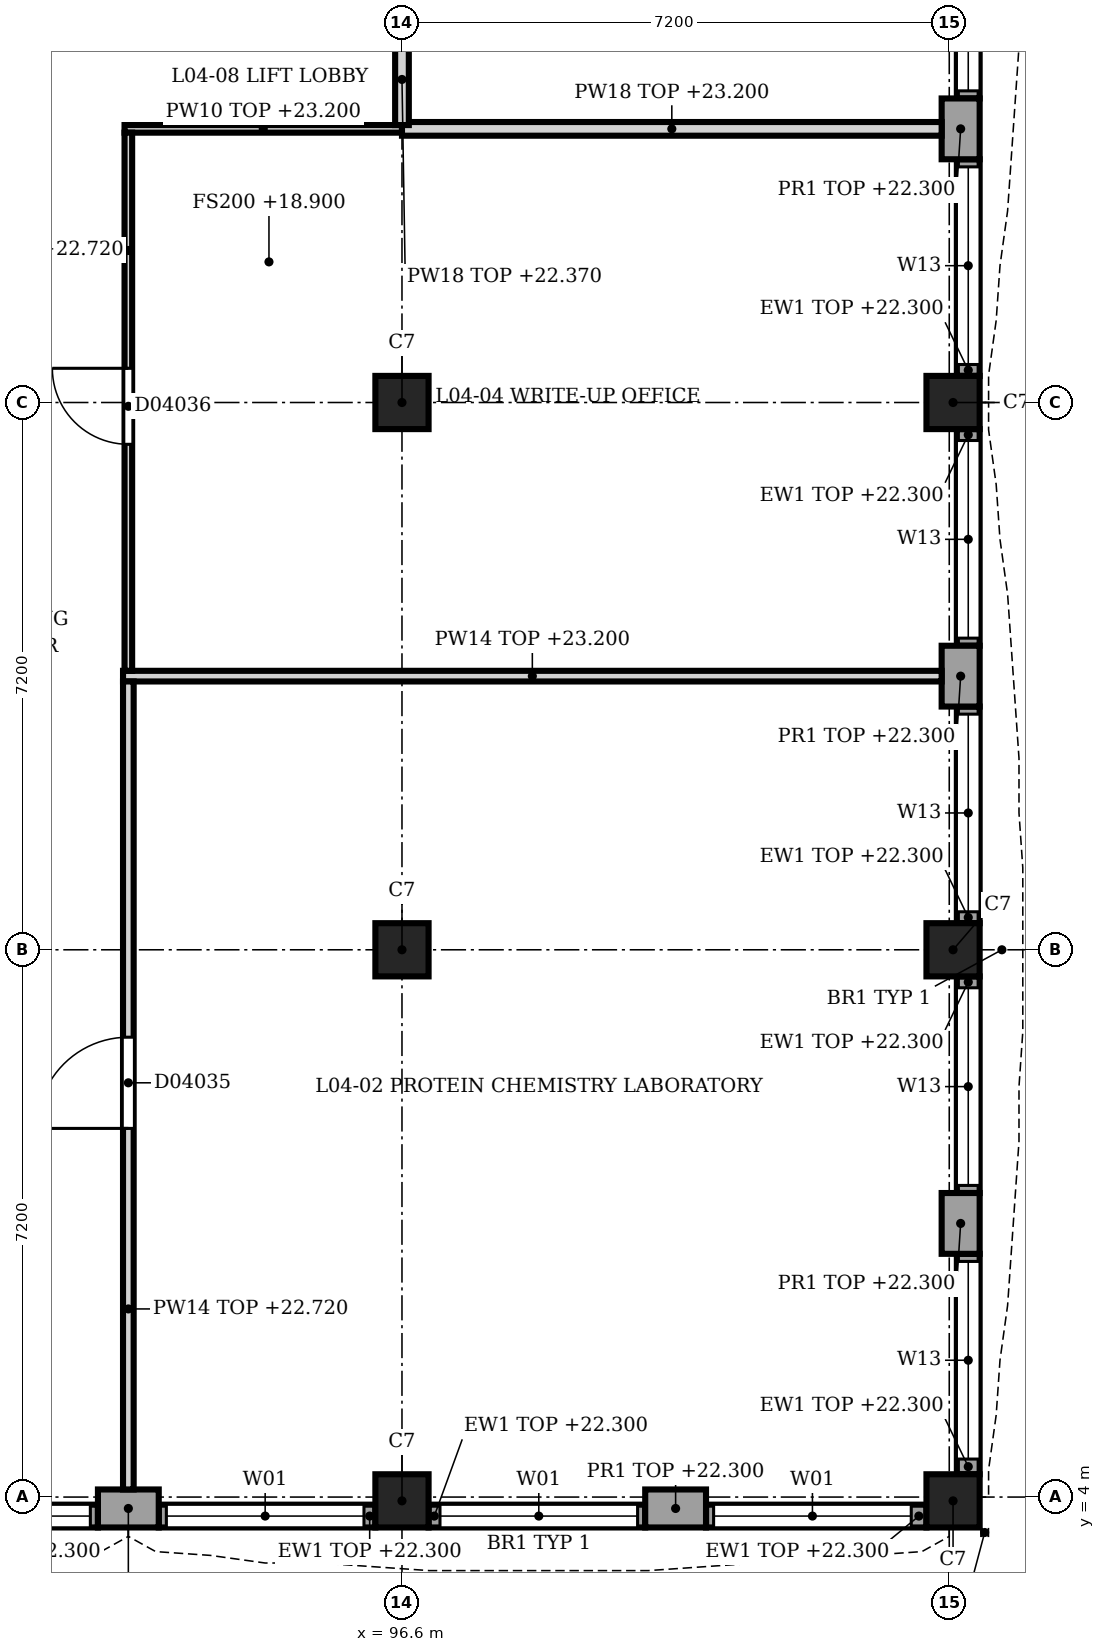
"""IFC4 building model, lengths in metres.
Left out: names, types, materials, properties, quantities, classifications, styles, units other than length and angle.
Written with IfcOpenShell. Run it as: python <this file> out.ifc"""

import sys

from ifc_helpers import new_model, si_unit, direction, frame, frame_2d, origin, origin_2d, place, context, subcontext, project, spatial, rectangle, extrude, element, fill, save


model = new_model("IFC4")
c1 = context("Model", 3, precision=1e-05, world=origin(), true_north=direction((0.0, 1.0)))
c2 = subcontext(c1, "Body", "Model", "MODEL_VIEW")
j1 = project(units=[si_unit("LENGTHUNIT", "METRE"), si_unit("PLANEANGLEUNIT", "RADIAN")], contexts=[c1])
p1 = place(None, origin())
s1 = spatial("IfcSite", under=j1, at=p1, CompositionType="ELEMENT")
p2 = place(p1, origin())
s2 = spatial("IfcBuilding", under=s1, at=p2, CompositionType="ELEMENT")
p3 = place(p2, frame((0.0, 0.0, 18.9)))
s3 = spatial("IfcBuildingStorey", under=s2, at=p3, CompositionType="ELEMENT", Elevation=18.9)
for number, where, z_axis, x_axis in (
    (1, (96.6, 3.95, 0.0), (0.0, 0.0, 1.0), (1.0, 0.0, 0.0)),
    (2, (96.6, 11.2, 0.0), (0.0, 0.0, 1.0), (1.0, 0.0, 0.0)),
    (3, (96.6, 18.4, 0.0), (0.0, 0.0, 1.0), (1.0, 0.0, 0.0)),
    (4, (103.85, 3.95, 0.0), (0.0, 0.0, 1.0), (1.0, 0.0, 0.0)),
    (5, (103.85, 11.2, 0.0), (0.0, 0.0, 1.0), (1.0, 0.0, 0.0)),
    (6, (103.85, 18.4, 0.0), (0.0, 0.0, 1.0), (1.0, 0.0, 0.0)),
):
    element("IfcColumn", number, at=place(p3, frame(where, z_axis=z_axis, x_axis=x_axis)), inside=s3, PredefinedType="COLUMN", context=c2, shape_type="SweptSolid", body=[
        extrude(rectangle(XDim=0.7, YDim=0.7, at=origin_2d()), origin(), (0.0, 0.0, 1.0), 4.5),
    ])
p4 = place(p3, frame((103.95, 22.4, 0.0), z_axis=(0.0, 0.0, 1.0), x_axis=(0.0, -1.0, 0.0)))
e7 = element("IfcWall", 7, at=p4, inside=s3, PredefinedType="SOLIDWALL", context=c2, shape_type="SweptSolid", body=[
    extrude(rectangle(XDim=0.8, YDim=0.5, at=frame_2d((0.4, 0.0))), origin(), (0.0, 0.0, 1.0), 3.4),
])
for number, where, z_axis, x_axis in (
    (8, (103.95, 15.2, 0.0), (0.0, 0.0, 1.0), (0.0, -1.0, 0.0)),
    (9, (103.95, 8.0, 0.0), (0.0, 0.0, 1.0), (0.0, -1.0, 0.0)),
):
    element("IfcWall", number, at=place(p3, frame(where, z_axis=z_axis, x_axis=x_axis)), inside=s3, PredefinedType="SOLIDWALL", context=c2, shape_type="SweptSolid", body=[
        extrude(rectangle(XDim=0.8, YDim=0.5, at=frame_2d((0.4, 0.0))), origin(), (0.0, 0.0, 1.0), 3.4),
    ])
p5 = place(p3, frame((104.05, 25.25, 0.0), z_axis=(0.0, 0.0, 1.0), x_axis=(0.0, -1.0, 0.0)))
e10 = element("IfcWall", 10, at=p5, inside=s3, PredefinedType="SOLIDWALL", context=c2, shape_type="SweptSolid", body=[
    extrude(rectangle(XDim=2.85, YDim=0.3, at=frame_2d((1.425, 0.0))), origin(), (0.0, 0.0, 1.0), 3.4),
])
p6 = place(p5, frame((0.15, 0.0, 0.9)))
e11 = element("IfcOpeningElement", 11, at=p6, cuts=e10, PredefinedType="OPENING", context=c2, shape_type="SweptSolid", body=[
    extrude(rectangle(XDim=2.6, YDim=2.2, at=frame_2d((1.3, 1.1))), frame((0.0, 0.16, 0.0), z_axis=(0.0, -1.0, 0.0), x_axis=(1.0, 0.0, 0.0)), (0.0, 0.0, 1.0), 0.32),
])
p7 = place(p3, frame((104.05, 21.6, 0.0), z_axis=(0.0, 0.0, 1.0), x_axis=(0.0, -1.0, 0.0)))
e12 = element("IfcWall", 12, at=p7, inside=s3, PredefinedType="SOLIDWALL", context=c2, shape_type="SweptSolid", body=[
    extrude(rectangle(XDim=2.85, YDim=0.3, at=frame_2d((1.425, 0.0))), origin(), (0.0, 0.0, 1.0), 3.4),
])
p8 = place(p7, frame((0.1, 0.0, 0.9)))
e13 = element("IfcOpeningElement", 13, at=p8, cuts=e12, PredefinedType="OPENING", context=c2, shape_type="SweptSolid", body=[
    extrude(rectangle(XDim=2.6, YDim=2.2, at=frame_2d((1.3, 1.1))), frame((0.0, 0.16, 0.0), z_axis=(0.0, -1.0, 0.0), x_axis=(1.0, 0.0, 0.0)), (0.0, 0.0, 1.0), 0.32),
])
p9 = place(p3, frame((104.05, 18.05, 0.0), z_axis=(0.0, 0.0, 1.0), x_axis=(0.0, -1.0, 0.0)))
e14 = element("IfcWall", 14, at=p9, inside=s3, PredefinedType="SOLIDWALL", context=c2, shape_type="SweptSolid", body=[
    extrude(rectangle(XDim=2.85, YDim=0.3, at=frame_2d((1.425, 0.0))), origin(), (0.0, 0.0, 1.0), 3.4),
])
p10 = place(p9, frame((0.15, 0.0, 0.9)))
e15 = element("IfcOpeningElement", 15, at=p10, cuts=e14, PredefinedType="OPENING", context=c2, shape_type="SweptSolid", body=[
    extrude(rectangle(XDim=2.6, YDim=2.2, at=frame_2d((1.3, 1.1))), frame((0.0, 0.16, 0.0), z_axis=(0.0, -1.0, 0.0), x_axis=(1.0, 0.0, 0.0)), (0.0, 0.0, 1.0), 0.32),
])
p11 = place(p3, frame((104.05, 14.4, 0.0), z_axis=(0.0, 0.0, 1.0), x_axis=(0.0, -1.0, 0.0)))
e16 = element("IfcWall", 16, at=p11, inside=s3, PredefinedType="SOLIDWALL", context=c2, shape_type="SweptSolid", body=[
    extrude(rectangle(XDim=2.85, YDim=0.3, at=frame_2d((1.425, 0.0))), origin(), (0.0, 0.0, 1.0), 3.4),
])
p12 = place(p11, frame((0.1, 0.0, 0.9)))
e17 = element("IfcOpeningElement", 17, at=p12, cuts=e16, PredefinedType="OPENING", context=c2, shape_type="SweptSolid", body=[
    extrude(rectangle(XDim=2.6, YDim=2.2, at=frame_2d((1.3, 1.1))), frame((0.0, 0.16, 0.0), z_axis=(0.0, -1.0, 0.0), x_axis=(1.0, 0.0, 0.0)), (0.0, 0.0, 1.0), 0.32),
])
p13 = place(p3, frame((104.05, 10.85, 0.0), z_axis=(0.0, 0.0, 1.0), x_axis=(0.0, -1.0, 0.0)))
e18 = element("IfcWall", 18, at=p13, inside=s3, PredefinedType="SOLIDWALL", context=c2, shape_type="SweptSolid", body=[
    extrude(rectangle(XDim=2.85, YDim=0.3, at=frame_2d((1.425, 0.0))), origin(), (0.0, 0.0, 1.0), 3.4),
])
p14 = place(p13, frame((0.15, 0.0, 0.9)))
e19 = element("IfcOpeningElement", 19, at=p14, cuts=e18, PredefinedType="OPENING", context=c2, shape_type="SweptSolid", body=[
    extrude(rectangle(XDim=2.6, YDim=2.2, at=frame_2d((1.3, 1.1))), frame((0.0, 0.16, 0.0), z_axis=(0.0, -1.0, 0.0), x_axis=(1.0, 0.0, 0.0)), (0.0, 0.0, 1.0), 0.32),
])
p15 = place(p3, frame((104.05, 7.2, 0.0), z_axis=(0.0, 0.0, 1.0), x_axis=(0.0, -1.0, 0.0)))
e20 = element("IfcWall", 20, at=p15, inside=s3, PredefinedType="SOLIDWALL", context=c2, shape_type="SweptSolid", body=[
    extrude(rectangle(XDim=2.9, YDim=0.3, at=frame_2d((1.45, 0.0))), origin(), (0.0, 0.0, 1.0), 3.4),
])
p16 = place(p15, frame((0.1, 0.0, 0.9)))
e21 = element("IfcOpeningElement", 21, at=p16, cuts=e20, PredefinedType="OPENING", context=c2, shape_type="SweptSolid", body=[
    extrude(rectangle(XDim=2.6, YDim=2.2, at=frame_2d((1.3, 1.1))), frame((0.0, 0.16, 0.0), z_axis=(0.0, -1.0, 0.0), x_axis=(1.0, 0.0, 0.0)), (0.0, 0.0, 1.0), 0.32),
])
p17 = place(p3, frame((100.6, 3.85, 0.0), z_axis=(0.0, 0.0, 1.0), x_axis=(-1.0, 0.0, 0.0)))
e22 = element("IfcWall", 22, at=p17, inside=s3, PredefinedType="SOLIDWALL", context=c2, shape_type="SweptSolid", body=[
    extrude(rectangle(XDim=0.8, YDim=0.5, at=frame_2d((0.4, 0.0))), origin(), (0.0, 0.0, 1.0), 3.4),
])
p18 = place(p3, frame((93.4, 3.85, 0.0), z_axis=(0.0, 0.0, 1.0), x_axis=(-1.0, 0.0, 0.0)))
e23 = element("IfcWall", 23, at=p18, inside=s3, PredefinedType="SOLIDWALL", context=c2, shape_type="SweptSolid", body=[
    extrude(rectangle(XDim=0.8, YDim=0.5, at=frame_2d((0.4, 0.0))), origin(), (0.0, 0.0, 1.0), 3.4),
])
p19 = place(p3, frame((103.5, 3.75, 0.0), z_axis=(0.0, 0.0, 1.0), x_axis=(-1.0, 0.0, 0.0)))
e24 = element("IfcWall", 24, at=p19, inside=s3, PredefinedType="SOLIDWALL", context=c2, shape_type="SweptSolid", body=[
    extrude(rectangle(XDim=2.9, YDim=0.3, at=frame_2d((1.45, 0.0))), origin(), (0.0, 0.0, 1.0), 3.4),
])
p20 = place(p19, frame((0.2, 0.0, 0.9)))
e25 = element("IfcOpeningElement", 25, at=p20, cuts=e24, PredefinedType="OPENING", context=c2, shape_type="SweptSolid", body=[
    extrude(rectangle(XDim=2.6, YDim=2.4, at=frame_2d((1.3, 1.2))), frame((0.0, 0.16, 0.0), z_axis=(0.0, -1.0, 0.0), x_axis=(1.0, 0.0, 0.0)), (0.0, 0.0, 1.0), 0.32),
])
p21 = place(p3, frame((99.8, 3.75, 0.0), z_axis=(0.0, 0.0, 1.0), x_axis=(-1.0, 0.0, 0.0)))
e26 = element("IfcWall", 26, at=p21, inside=s3, PredefinedType="SOLIDWALL", context=c2, shape_type="SweptSolid", body=[
    extrude(rectangle(XDim=2.85, YDim=0.3, at=frame_2d((1.425, 0.0))), origin(), (0.0, 0.0, 1.0), 3.4),
])
p22 = place(p21, frame((0.1, 0.0, 0.9)))
e27 = element("IfcOpeningElement", 27, at=p22, cuts=e26, PredefinedType="OPENING", context=c2, shape_type="SweptSolid", body=[
    extrude(rectangle(XDim=2.6, YDim=2.4, at=frame_2d((1.3, 1.2))), frame((0.0, 0.16, 0.0), z_axis=(0.0, -1.0, 0.0), x_axis=(1.0, 0.0, 0.0)), (0.0, 0.0, 1.0), 0.32),
])
p23 = place(p3, frame((96.25, 3.75, 0.0), z_axis=(0.0, 0.0, 1.0), x_axis=(-1.0, 0.0, 0.0)))
e28 = element("IfcWall", 28, at=p23, inside=s3, PredefinedType="SOLIDWALL", context=c2, shape_type="SweptSolid", body=[
    extrude(rectangle(XDim=2.85, YDim=0.3, at=frame_2d((1.425, 0.0))), origin(), (0.0, 0.0, 1.0), 3.4),
])
p24 = place(p23, frame((0.15, 0.0, 0.9)))
e29 = element("IfcOpeningElement", 29, at=p24, cuts=e28, PredefinedType="OPENING", context=c2, shape_type="SweptSolid", body=[
    extrude(rectangle(XDim=2.6, YDim=2.4, at=frame_2d((1.3, 1.2))), frame((0.0, 0.16, 0.0), z_axis=(0.0, -1.0, 0.0), x_axis=(1.0, 0.0, 0.0)), (0.0, 0.0, 1.0), 0.32),
])
p25 = place(p3, frame((92.6, 3.75, 0.0), z_axis=(0.0, 0.0, 1.0), x_axis=(-1.0, 0.0, 0.0)))
e30 = element("IfcWall", 30, at=p25, inside=s3, PredefinedType="SOLIDWALL", context=c2, shape_type="SweptSolid", body=[
    extrude(rectangle(XDim=2.85, YDim=0.3, at=frame_2d((1.425, 0.0))), origin(), (0.0, 0.0, 1.0), 3.4),
])
p26 = place(p25, frame((0.1, 0.0, 0.9)))
e31 = element("IfcOpeningElement", 31, at=p26, cuts=e30, PredefinedType="OPENING", context=c2, shape_type="SweptSolid", body=[
    extrude(rectangle(XDim=2.6, YDim=2.4, at=frame_2d((1.3, 1.2))), frame((0.0, 0.16, 0.0), z_axis=(0.0, -1.0, 0.0), x_axis=(1.0, 0.0, 0.0)), (0.0, 0.0, 1.0), 0.32),
])
p27 = place(p3, frame((92.93, 14.8, 0.0), z_axis=(0.0, 0.0, 1.0), x_axis=(1.0, 0.0, 0.0)))
e32 = element("IfcWall", 32, at=p27, inside=s3, PredefinedType="PARTITIONING", context=c2, shape_type="SweptSolid", body=[
    extrude(rectangle(XDim=10.77, YDim=0.14, at=frame_2d((5.385, 0.0))), origin(), (0.0, 0.0, 1.0), 4.3),
])
p28 = place(p3, frame((92.95, 22.0, 0.0), z_axis=(0.0, 0.0, 1.0), x_axis=(1.0, 0.0, 0.0)))
e33 = element("IfcWall", 33, at=p28, inside=s3, PredefinedType="PARTITIONING", context=c2, shape_type="SweptSolid", body=[
    extrude(rectangle(XDim=3.65, YDim=0.1, at=frame_2d((1.825, 0.0))), origin(), (0.0, 0.0, 1.0), 4.3),
])
p29 = place(p3, frame((96.6, 22.0, 0.0), z_axis=(0.0, 0.0, 1.0), x_axis=(1.0, 0.0, 0.0)))
e34 = element("IfcWall", 34, at=p29, inside=s3, PredefinedType="PARTITIONING", context=c2, shape_type="SweptSolid", body=[
    extrude(rectangle(XDim=7.1, YDim=0.18, at=frame_2d((3.55, 0.0))), origin(), (0.0, 0.0, 1.0), 4.3),
])
p30 = place(p3, frame((93.0, 14.73, 0.0), z_axis=(0.0, 0.0, 1.0), x_axis=(0.0, -1.0, 0.0)))
e35 = element("IfcWall", 35, at=p30, inside=s3, PredefinedType="PARTITIONING", context=c2, shape_type="SweptSolid", body=[
    extrude(rectangle(XDim=10.63, YDim=0.14, at=frame_2d((5.315, 0.0))), origin(), (0.0, 0.0, 1.0), 3.82),
])
p31 = place(p30, frame((4.68, 0.0, 0.0)))
e36 = element("IfcOpeningElement", 36, at=p31, cuts=e35, PredefinedType="OPENING", context=c2, shape_type="SweptSolid", body=[
    extrude(rectangle(XDim=1.2, YDim=2.1, at=frame_2d((0.6, 1.05))), frame((0.0, 0.08, 0.0), z_axis=(0.0, -1.0, 0.0), x_axis=(1.0, 0.0, 0.0)), (0.0, 0.0, 1.0), 0.16),
])
p32 = place(p3, frame((93.0, 21.95, 0.0), z_axis=(0.0, 0.0, 1.0), x_axis=(0.0, -1.0, 0.0)))
e37 = element("IfcWall", 37, at=p32, inside=s3, PredefinedType="PARTITIONING", context=c2, shape_type="SweptSolid", body=[
    extrude(rectangle(XDim=7.08, YDim=0.1, at=frame_2d((3.54, 0.0))), origin(), (0.0, 0.0, 1.0), 3.82),
])
p33 = place(p32, frame((3.1, 0.0, 0.0)))
e38 = element("IfcOpeningElement", 38, at=p33, cuts=e37, PredefinedType="OPENING", context=c2, shape_type="SweptSolid", body=[
    extrude(rectangle(XDim=1.0, YDim=2.1, at=frame_2d((0.5, 1.05))), frame((0.0, 0.06, 0.0), z_axis=(0.0, -1.0, 0.0), x_axis=(1.0, 0.0, 0.0)), (0.0, 0.0, 1.0), 0.12),
])
p34 = place(p3, frame((96.6, 25.25, 0.0), z_axis=(0.0, 0.0, 1.0), x_axis=(0.0, -1.0, 0.0)))
e39 = element("IfcWall", 39, at=p34, inside=s3, PredefinedType="PARTITIONING", context=c2, shape_type="SweptSolid", body=[
    extrude(rectangle(XDim=3.2, YDim=0.18, at=frame_2d((1.6, 0.0))), origin(), (0.0, 0.0, 1.0), 3.47),
])
p35 = place(p34, frame((1.0, 0.0, 0.0)))
e40 = element("IfcOpeningElement", 40, at=p35, cuts=e39, PredefinedType="OPENING", context=c2, shape_type="SweptSolid", body=[
    extrude(rectangle(XDim=1.0, YDim=2.1, at=frame_2d((0.5, 1.05))), frame((0.0, 0.1, 0.0), z_axis=(0.0, -1.0, 0.0), x_axis=(1.0, 0.0, 0.0)), (0.0, 0.0, 1.0), 0.2),
])
p36 = place(p6, origin())
e41 = element("IfcWindow", 41, at=p36, inside=s3, PartitioningType="SINGLE_PANEL", PredefinedType="WINDOW", context=c2, shape_type="SweptSolid", body=[
    extrude(rectangle(XDim=2.6, YDim=2.2, at=frame_2d((1.3, 1.1))), frame((0.0, 0.03, 0.0), z_axis=(0.0, -1.0, 0.0), x_axis=(1.0, 0.0, 0.0)), (0.0, 0.0, 1.0), 0.06),
])
fill(e11, e41)
p37 = place(p8, origin())
e42 = element("IfcWindow", 42, at=p37, inside=s3, PartitioningType="SINGLE_PANEL", PredefinedType="WINDOW", context=c2, shape_type="SweptSolid", body=[
    extrude(rectangle(XDim=2.6, YDim=2.2, at=frame_2d((1.3, 1.1))), frame((0.0, 0.03, 0.0), z_axis=(0.0, -1.0, 0.0), x_axis=(1.0, 0.0, 0.0)), (0.0, 0.0, 1.0), 0.06),
])
fill(e13, e42)
p38 = place(p10, origin())
e43 = element("IfcWindow", 43, at=p38, inside=s3, PartitioningType="SINGLE_PANEL", PredefinedType="WINDOW", context=c2, shape_type="SweptSolid", body=[
    extrude(rectangle(XDim=2.6, YDim=2.2, at=frame_2d((1.3, 1.1))), frame((0.0, 0.03, 0.0), z_axis=(0.0, -1.0, 0.0), x_axis=(1.0, 0.0, 0.0)), (0.0, 0.0, 1.0), 0.06),
])
fill(e15, e43)
p39 = place(p12, origin())
e44 = element("IfcWindow", 44, at=p39, inside=s3, PartitioningType="SINGLE_PANEL", PredefinedType="WINDOW", context=c2, shape_type="SweptSolid", body=[
    extrude(rectangle(XDim=2.6, YDim=2.2, at=frame_2d((1.3, 1.1))), frame((0.0, 0.03, 0.0), z_axis=(0.0, -1.0, 0.0), x_axis=(1.0, 0.0, 0.0)), (0.0, 0.0, 1.0), 0.06),
])
fill(e17, e44)
p40 = place(p14, origin())
e45 = element("IfcWindow", 45, at=p40, inside=s3, PartitioningType="SINGLE_PANEL", PredefinedType="WINDOW", context=c2, shape_type="SweptSolid", body=[
    extrude(rectangle(XDim=2.6, YDim=2.2, at=frame_2d((1.3, 1.1))), frame((0.0, 0.03, 0.0), z_axis=(0.0, -1.0, 0.0), x_axis=(1.0, 0.0, 0.0)), (0.0, 0.0, 1.0), 0.06),
])
fill(e19, e45)
p41 = place(p16, origin())
e46 = element("IfcWindow", 46, at=p41, inside=s3, PartitioningType="SINGLE_PANEL", PredefinedType="WINDOW", context=c2, shape_type="SweptSolid", body=[
    extrude(rectangle(XDim=2.6, YDim=2.2, at=frame_2d((1.3, 1.1))), frame((0.0, 0.03, 0.0), z_axis=(0.0, -1.0, 0.0), x_axis=(1.0, 0.0, 0.0)), (0.0, 0.0, 1.0), 0.06),
])
fill(e21, e46)
p42 = place(p20, origin())
e47 = element("IfcWindow", 47, at=p42, inside=s3, PartitioningType="SINGLE_PANEL", PredefinedType="WINDOW", context=c2, shape_type="SweptSolid", body=[
    extrude(rectangle(XDim=2.6, YDim=2.4, at=frame_2d((1.3, 1.2))), frame((0.0, 0.03, 0.0), z_axis=(0.0, -1.0, 0.0), x_axis=(1.0, 0.0, 0.0)), (0.0, 0.0, 1.0), 0.06),
])
fill(e25, e47)
p43 = place(p22, origin())
e48 = element("IfcWindow", 48, at=p43, inside=s3, PartitioningType="SINGLE_PANEL", PredefinedType="WINDOW", context=c2, shape_type="SweptSolid", body=[
    extrude(rectangle(XDim=2.6, YDim=2.4, at=frame_2d((1.3, 1.2))), frame((0.0, 0.03, 0.0), z_axis=(0.0, -1.0, 0.0), x_axis=(1.0, 0.0, 0.0)), (0.0, 0.0, 1.0), 0.06),
])
fill(e27, e48)
p44 = place(p24, origin())
e49 = element("IfcWindow", 49, at=p44, inside=s3, PartitioningType="SINGLE_PANEL", PredefinedType="WINDOW", context=c2, shape_type="SweptSolid", body=[
    extrude(rectangle(XDim=2.6, YDim=2.4, at=frame_2d((1.3, 1.2))), frame((0.0, 0.03, 0.0), z_axis=(0.0, -1.0, 0.0), x_axis=(1.0, 0.0, 0.0)), (0.0, 0.0, 1.0), 0.06),
])
fill(e29, e49)
p45 = place(p26, origin())
e50 = element("IfcWindow", 50, at=p45, inside=s3, PartitioningType="SINGLE_PANEL", PredefinedType="WINDOW", context=c2, shape_type="SweptSolid", body=[
    extrude(rectangle(XDim=2.6, YDim=2.4, at=frame_2d((1.3, 1.2))), frame((0.0, 0.03, 0.0), z_axis=(0.0, -1.0, 0.0), x_axis=(1.0, 0.0, 0.0)), (0.0, 0.0, 1.0), 0.06),
])
fill(e31, e50)
p46 = place(p31, origin())
e51 = element("IfcDoor", 51, at=p46, inside=s3, OperationType="SINGLE_SWING_LEFT", PredefinedType="DOOR", context=c2, shape_type="SweptSolid", body=[
    extrude(rectangle(XDim=1.2, YDim=2.1, at=frame_2d((0.6, 1.05))), frame((0.0, 0.025, 0.0), z_axis=(0.0, -1.0, 0.0), x_axis=(1.0, 0.0, 0.0)), (0.0, 0.0, 1.0), 0.05),
])
fill(e36, e51)
p47 = place(p33, origin())
e52 = element("IfcDoor", 52, at=p47, inside=s3, OperationType="SINGLE_SWING_RIGHT", PredefinedType="DOOR", context=c2, shape_type="SweptSolid", body=[
    extrude(rectangle(XDim=1.0, YDim=2.1, at=frame_2d((0.5, 1.05))), frame((0.0, 0.025, 0.0), z_axis=(0.0, -1.0, 0.0), x_axis=(1.0, 0.0, 0.0)), (0.0, 0.0, 1.0), 0.05),
])
fill(e38, e52)
save(model, sys.argv[1])
